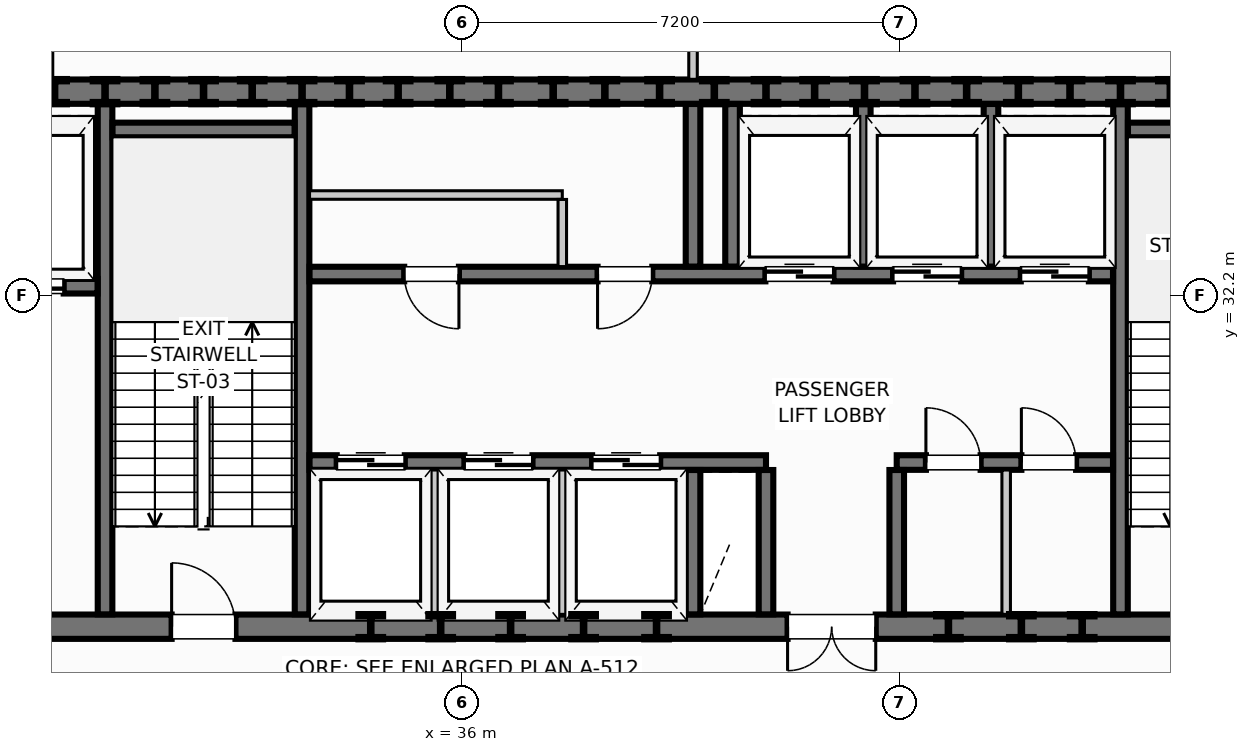
"""IFC4 building model, lengths in metres.
Left out: names, types, materials, properties, quantities, classifications, styles, units other than length and angle.
Written with IfcOpenShell. Run it as: python <this file> out.ifc"""

import sys

from ifc_helpers import new_model, si_unit, direction, frame, frame_2d, origin, origin_2d, place, context, subcontext, project, spatial, rectangle, i_section, extrude, element, fill, save


model = new_model("IFC4")
c1 = context("Model", 3, precision=1e-05, world=origin(), true_north=direction((0.0, 1.0)))
c2 = subcontext(c1, "Body", "Model", "MODEL_VIEW")
j1 = project(units=[si_unit("LENGTHUNIT", "METRE"), si_unit("PLANEANGLEUNIT", "RADIAN")], contexts=[c1])
p1 = place(None, origin())
s1 = spatial("IfcSite", under=j1, at=p1, CompositionType="ELEMENT")
p2 = place(p1, origin())
s2 = spatial("IfcBuilding", under=s1, at=p2, CompositionType="ELEMENT")
p3 = place(p2, frame((0.0, 0.0, 200.35)))
s3 = spatial("IfcBuildingStorey", under=s2, at=p3, CompositionType="ELEMENT", Elevation=200.35)
for number, where, z_axis, x_axis in (
    (1, (30.13, 35.55, 0.0), (0.0, 0.0, 1.0), (1.0, 0.0, 0.0)),
    (2, (31.75, 35.55, 0.0), (0.0, 0.0, 1.0), (1.0, 0.0, 0.0)),
    (3, (33.37, 35.55, 0.0), (0.0, 0.0, 1.0), (1.0, 0.0, 0.0)),
    (4, (34.95, 35.55, 0.0), (0.0, 0.0, 1.0), (1.0, 0.0, 0.0)),
    (5, (36.6, 35.55, 0.0), (0.0, 0.0, 1.0), (1.0, 0.0, 0.0)),
    (6, (38.35, 35.55, 0.0), (0.0, 0.0, 1.0), (1.0, 0.0, 0.0)),
    (7, (40.15, 35.55, 0.0), (0.0, 0.0, 1.0), (1.0, 0.0, 0.0)),
    (8, (41.8, 35.55, 0.0), (0.0, 0.0, 1.0), (1.0, 0.0, 0.0)),
    (9, (43.45, 35.55, 0.0), (0.0, 0.0, 1.0), (1.0, 0.0, 0.0)),
    (10, (45.15, 35.55, 0.0), (0.0, 0.0, 1.0), (1.0, 0.0, 0.0)),
    (11, (46.83, 35.55, 0.0), (0.0, 0.0, 1.0), (1.0, 0.0, 0.0)),
    (12, (34.5, 26.75, 0.0), (0.0, 0.0, 1.0), (1.0, 0.0, 0.0)),
    (13, (36.8, 26.75, 0.0), (0.0, 0.0, 1.0), (1.0, 0.0, 0.0)),
    (14, (39.2, 26.75, 0.0), (0.0, 0.0, 1.0), (1.0, 0.0, 0.0)),
    (15, (45.2, 26.75, 0.0), (0.0, 0.0, 1.0), (1.0, 0.0, 0.0)),
    (16, (32.55, 35.55, 0.0), (0.0, 0.0, 1.0), (1.0, 0.0, 0.0)),
    (17, (37.5, 35.55, 0.0), (0.0, 0.0, 1.0), (1.0, 0.0, 0.0)),
    (18, (42.62, 35.55, 0.0), (0.0, 0.0, 1.0), (1.0, 0.0, 0.0)),
    (19, (47.65, 35.55, 0.0), (0.0, 0.0, 1.0), (1.0, 0.0, 0.0)),
    (20, (29.3, 35.55, 0.0), (0.0, 0.0, 1.0), (1.0, 0.0, 0.0)),
    (21, (30.95, 35.55, 0.0), (0.0, 0.0, 1.0), (1.0, 0.0, 0.0)),
    (22, (34.15, 35.55, 0.0), (0.0, 0.0, 1.0), (1.0, 0.0, 0.0)),
    (23, (35.8, 35.55, 0.0), (0.0, 0.0, 1.0), (1.0, 0.0, 0.0)),
    (24, (39.25, 35.55, 0.0), (0.0, 0.0, 1.0), (1.0, 0.0, 0.0)),
    (25, (41.0, 35.55, 0.0), (0.0, 0.0, 1.0), (1.0, 0.0, 0.0)),
    (26, (44.3, 35.55, 0.0), (0.0, 0.0, 1.0), (1.0, 0.0, 0.0)),
    (27, (46.0, 35.55, 0.0), (0.0, 0.0, 1.0), (1.0, 0.0, 0.0)),
    (28, (35.65, 26.75, 0.0), (0.0, 0.0, 1.0), (1.0, 0.0, 0.0)),
    (29, (38.0, 26.75, 0.0), (0.0, 0.0, 1.0), (1.0, 0.0, 0.0)),
    (30, (44.0, 26.75, 0.0), (0.0, 0.0, 1.0), (1.0, 0.0, 0.0)),
    (31, (46.2, 26.75, 0.0), (0.0, 0.0, 1.0), (1.0, 0.0, 0.0)),
):
    element("IfcColumn", number, at=place(p3, frame(where, z_axis=z_axis, x_axis=x_axis)), inside=s3, PredefinedType="COLUMN", context=c2, shape_type="SweptSolid", body=[
        extrude(i_section(OverallWidth=0.406, OverallDepth=0.416, WebThickness=0.024, FlangeThickness=0.039, at=origin_2d()), origin(), (0.0, 0.0, 1.0), 4.5),
    ])
p4 = place(p3, frame((21.65, 26.75, 0.0), z_axis=(0.0, 0.0, 1.0), x_axis=(1.0, 0.0, 0.0)))
e32 = element("IfcWall", 32, at=p4, inside=s3, PredefinedType="SHEAR", context=c2, shape_type="SweptSolid", body=[
    extrude(rectangle(XDim=28.7, YDim=0.4, at=frame_2d((14.35, 0.0))), origin(), (0.0, 0.0, 1.0), 4.5),
])
p5 = place(p4, frame((1.375, 0.0, 0.0)))
e33 = element("IfcOpeningElement", 33, at=p5, cuts=e32, PredefinedType="OPENING", context=c2, shape_type="SweptSolid", body=[
    extrude(rectangle(XDim=1.05, YDim=2.0, at=frame_2d((0.525, 1.0))), frame((0.0, 0.21, 0.0), z_axis=(0.0, -1.0, 0.0), x_axis=(1.0, 0.0, 0.0)), (0.0, 0.0, 1.0), 0.42),
])
p6 = place(p4, frame((5.375, 0.0, 0.0)))
e34 = element("IfcOpeningElement", 34, at=p6, cuts=e32, PredefinedType="OPENING", context=c2, shape_type="SweptSolid", body=[
    extrude(rectangle(XDim=1.05, YDim=2.0, at=frame_2d((0.525, 1.0))), frame((0.0, 0.21, 0.0), z_axis=(0.0, -1.0, 0.0), x_axis=(1.0, 0.0, 0.0)), (0.0, 0.0, 1.0), 0.42),
])
p7 = place(p4, frame((9.575, 0.0, 0.0)))
e35 = element("IfcOpeningElement", 35, at=p7, cuts=e32, PredefinedType="OPENING", context=c2, shape_type="SweptSolid", body=[
    extrude(rectangle(XDim=1.05, YDim=2.0, at=frame_2d((0.525, 1.0))), frame((0.0, 0.21, 0.0), z_axis=(0.0, -1.0, 0.0), x_axis=(1.0, 0.0, 0.0)), (0.0, 0.0, 1.0), 0.42),
])
p8 = place(p4, frame((19.705, 0.0, 0.0)))
e36 = element("IfcOpeningElement", 36, at=p8, cuts=e32, PredefinedType="OPENING", context=c2, shape_type="SweptSolid", body=[
    extrude(rectangle(XDim=1.45, YDim=2.0, at=frame_2d((0.725, 1.0))), frame((0.0, 0.21, 0.0), z_axis=(0.0, -1.0, 0.0), x_axis=(1.0, 0.0, 0.0)), (0.0, 0.0, 1.0), 0.42),
])
p9 = place(p4, frame((26.275, 0.0, 0.0)))
e37 = element("IfcOpeningElement", 37, at=p9, cuts=e32, PredefinedType="OPENING", context=c2, shape_type="SweptSolid", body=[
    extrude(rectangle(XDim=1.05, YDim=2.0, at=frame_2d((0.525, 1.0))), frame((0.0, 0.21, 0.0), z_axis=(0.0, -1.0, 0.0), x_axis=(1.0, 0.0, 0.0)), (0.0, 0.0, 1.0), 0.42),
])
p10 = place(p3, frame((50.35, 35.55, 0.0), z_axis=(0.0, 0.0, 1.0), x_axis=(-1.0, 0.0, 0.0)))
e38 = element("IfcWall", 38, at=p10, inside=s3, PredefinedType="SHEAR", context=c2, shape_type="SweptSolid", body=[
    extrude(rectangle(XDim=28.7, YDim=0.4, at=frame_2d((14.35, 0.0))), origin(), (0.0, 0.0, 1.0), 4.5),
])
for number, where, z_axis, x_axis in (
    (39, (30.13, 26.953, 0.0), (0.0, 0.0, 1.0), (0.0, 1.0, 0.0)),
    (40, (33.37, 26.953, 0.0), (0.0, 0.0, 1.0), (0.0, 1.0, 0.0)),
):
    element("IfcWall", number, at=place(p3, frame(where, z_axis=z_axis, x_axis=x_axis)), inside=s3, PredefinedType="SHEAR", context=c2, shape_type="SweptSolid", body=[
        extrude(rectangle(XDim=8.394, YDim=0.24, at=frame_2d((4.197, 0.0))), origin(), (0.0, 0.0, 1.0), 4.5),
    ])
p11 = place(p3, frame((30.253, 34.92, 0.0), z_axis=(0.0, 0.0, 1.0), x_axis=(1.0, 0.0, 0.0)))
e41 = element("IfcWall", 41, at=p11, inside=s3, PredefinedType="SHEAR", context=c2, shape_type="SweptSolid", body=[
    extrude(rectangle(XDim=2.994, YDim=0.24, at=frame_2d((1.497, 0.0))), origin(), (0.0, 0.0, 1.0), 4.5),
])
p12 = place(p3, frame((46.83, 26.953, 0.0), z_axis=(0.0, 0.0, 1.0), x_axis=(0.0, 1.0, 0.0)))
e42 = element("IfcWall", 42, at=p12, inside=s3, PredefinedType="SHEAR", context=c2, shape_type="SweptSolid", body=[
    extrude(rectangle(XDim=8.394, YDim=0.24, at=frame_2d((4.197, 0.0))), origin(), (0.0, 0.0, 1.0), 4.5),
])
p13 = place(p3, frame((46.953, 34.92, 0.0), z_axis=(0.0, 0.0, 1.0), x_axis=(1.0, 0.0, 0.0)))
e43 = element("IfcWall", 43, at=p13, inside=s3, PredefinedType="SHEAR", context=c2, shape_type="SweptSolid", body=[
    extrude(rectangle(XDim=2.994, YDim=0.24, at=frame_2d((1.497, 0.0))), origin(), (0.0, 0.0, 1.0), 4.5),
])
p14 = place(p3, frame((25.293, 32.35, 0.0), z_axis=(0.0, 0.0, 1.0), x_axis=(1.0, 0.0, 0.0)))
e44 = element("IfcWall", 44, at=p14, inside=s3, PredefinedType="SHEAR", context=c2, shape_type="SweptSolid", body=[
    extrude(rectangle(XDim=4.714, YDim=0.24, at=frame_2d((2.357, 0.0))), origin(), (0.0, 0.0, 1.0), 4.5),
])
p15 = place(p14, frame((0.707, 0.0, 0.0)))
e45 = element("IfcOpeningElement", 45, at=p15, cuts=e44, PredefinedType="OPENING", context=c2, shape_type="SweptSolid", body=[
    extrude(rectangle(XDim=1.1, YDim=2.0, at=frame_2d((0.55, 1.0))), frame((0.0, 0.13, 0.0), z_axis=(0.0, -1.0, 0.0), x_axis=(1.0, 0.0, 0.0)), (0.0, 0.0, 1.0), 0.26),
])
p16 = place(p14, frame((3.057, 0.0, 0.0)))
e46 = element("IfcOpeningElement", 46, at=p16, cuts=e44, PredefinedType="OPENING", context=c2, shape_type="SweptSolid", body=[
    extrude(rectangle(XDim=1.1, YDim=2.0, at=frame_2d((0.55, 1.0))), frame((0.0, 0.13, 0.0), z_axis=(0.0, -1.0, 0.0), x_axis=(1.0, 0.0, 0.0)), (0.0, 0.0, 1.0), 0.26),
])
p17 = place(p3, frame((33.493, 32.55, 0.0), z_axis=(0.0, 0.0, 1.0), x_axis=(1.0, 0.0, 0.0)))
e47 = element("IfcWall", 47, at=p17, inside=s3, PredefinedType="SHEAR", context=c2, shape_type="SweptSolid", body=[
    extrude(rectangle(XDim=13.214, YDim=0.24, at=frame_2d((6.607, 0.0))), origin(), (0.0, 0.0, 1.0), 4.5),
])
p18 = place(p17, frame((1.557, 0.0, 0.0)))
e48 = element("IfcOpeningElement", 48, at=p18, cuts=e47, PredefinedType="OPENING", context=c2, shape_type="SweptSolid", body=[
    extrude(rectangle(XDim=0.9, YDim=2.0, at=frame_2d((0.45, 1.0))), frame((0.0, 0.13, 0.0), z_axis=(0.0, -1.0, 0.0), x_axis=(1.0, 0.0, 0.0)), (0.0, 0.0, 1.0), 0.26),
])
p19 = place(p17, frame((4.737, 0.0, 0.0)))
e49 = element("IfcOpeningElement", 49, at=p19, cuts=e47, PredefinedType="OPENING", context=c2, shape_type="SweptSolid", body=[
    extrude(rectangle(XDim=0.9, YDim=2.0, at=frame_2d((0.45, 1.0))), frame((0.0, 0.13, 0.0), z_axis=(0.0, -1.0, 0.0), x_axis=(1.0, 0.0, 0.0)), (0.0, 0.0, 1.0), 0.26),
])
p20 = place(p17, frame((7.497, 0.0, 0.0)))
e50 = element("IfcOpeningElement", 50, at=p20, cuts=e47, PredefinedType="OPENING", context=c2, shape_type="SweptSolid", body=[
    extrude(rectangle(XDim=1.12, YDim=2.0, at=frame_2d((0.56, 1.0))), frame((0.0, 0.13, 0.0), z_axis=(0.0, -1.0, 0.0), x_axis=(1.0, 0.0, 0.0)), (0.0, 0.0, 1.0), 0.26),
])
p21 = place(p17, frame((9.597, 0.0, 0.0)))
e51 = element("IfcOpeningElement", 51, at=p21, cuts=e47, PredefinedType="OPENING", context=c2, shape_type="SweptSolid", body=[
    extrude(rectangle(XDim=1.12, YDim=2.0, at=frame_2d((0.56, 1.0))), frame((0.0, 0.13, 0.0), z_axis=(0.0, -1.0, 0.0), x_axis=(1.0, 0.0, 0.0)), (0.0, 0.0, 1.0), 0.26),
])
p22 = place(p17, frame((11.697, 0.0, 0.0)))
e52 = element("IfcOpeningElement", 52, at=p22, cuts=e47, PredefinedType="OPENING", context=c2, shape_type="SweptSolid", body=[
    extrude(rectangle(XDim=1.12, YDim=2.0, at=frame_2d((0.56, 1.0))), frame((0.0, 0.13, 0.0), z_axis=(0.0, -1.0, 0.0), x_axis=(1.0, 0.0, 0.0)), (0.0, 0.0, 1.0), 0.26),
])
p23 = place(p3, frame((33.493, 29.45, 0.0), z_axis=(0.0, 0.0, 1.0), x_axis=(1.0, 0.0, 0.0)))
e53 = element("IfcWall", 53, at=p23, inside=s3, PredefinedType="SHEAR", context=c2, shape_type="SweptSolid", body=[
    extrude(rectangle(XDim=7.507, YDim=0.24, at=frame_2d((3.753, 0.0))), origin(), (0.0, 0.0, 1.0), 4.5),
])
p24 = place(p23, frame((0.447, 0.0, 0.0)))
e54 = element("IfcOpeningElement", 54, at=p24, cuts=e53, PredefinedType="OPENING", context=c2, shape_type="SweptSolid", body=[
    extrude(rectangle(XDim=1.12, YDim=2.0, at=frame_2d((0.56, 1.0))), frame((0.0, 0.13, 0.0), z_axis=(0.0, -1.0, 0.0), x_axis=(1.0, 0.0, 0.0)), (0.0, 0.0, 1.0), 0.26),
])
p25 = place(p23, frame((2.547, 0.0, 0.0)))
e55 = element("IfcOpeningElement", 55, at=p25, cuts=e53, PredefinedType="OPENING", context=c2, shape_type="SweptSolid", body=[
    extrude(rectangle(XDim=1.12, YDim=2.0, at=frame_2d((0.56, 1.0))), frame((0.0, 0.13, 0.0), z_axis=(0.0, -1.0, 0.0), x_axis=(1.0, 0.0, 0.0)), (0.0, 0.0, 1.0), 0.26),
])
p26 = place(p23, frame((4.647, 0.0, 0.0)))
e56 = element("IfcOpeningElement", 56, at=p26, cuts=e53, PredefinedType="OPENING", context=c2, shape_type="SweptSolid", body=[
    extrude(rectangle(XDim=1.12, YDim=2.0, at=frame_2d((0.56, 1.0))), frame((0.0, 0.13, 0.0), z_axis=(0.0, -1.0, 0.0), x_axis=(1.0, 0.0, 0.0)), (0.0, 0.0, 1.0), 0.26),
])
p27 = place(p3, frame((43.15, 29.45, 0.0), z_axis=(0.0, 0.0, 1.0), x_axis=(1.0, 0.0, 0.0)))
e57 = element("IfcWall", 57, at=p27, inside=s3, PredefinedType="SHEAR", context=c2, shape_type="SweptSolid", body=[
    extrude(rectangle(XDim=3.557, YDim=0.24, at=frame_2d((1.779, 0.0))), origin(), (0.0, 0.0, 1.0), 4.5),
])
p28 = place(p27, frame((0.48, 0.0, 0.0)))
e58 = element("IfcOpeningElement", 58, at=p28, cuts=e57, PredefinedType="OPENING", context=c2, shape_type="SweptSolid", body=[
    extrude(rectangle(XDim=0.9, YDim=2.0, at=frame_2d((0.45, 1.0))), frame((0.0, 0.13, 0.0), z_axis=(0.0, -1.0, 0.0), x_axis=(1.0, 0.0, 0.0)), (0.0, 0.0, 1.0), 0.26),
])
p29 = place(p27, frame((2.05, 0.0, 0.0)))
e59 = element("IfcOpeningElement", 59, at=p29, cuts=e57, PredefinedType="OPENING", context=c2, shape_type="SweptSolid", body=[
    extrude(rectangle(XDim=0.9, YDim=2.0, at=frame_2d((0.45, 1.0))), frame((0.0, 0.13, 0.0), z_axis=(0.0, -1.0, 0.0), x_axis=(1.0, 0.0, 0.0)), (0.0, 0.0, 1.0), 0.26),
])
for number, where, z_axis, x_axis in (
    (60, (41.0, 26.953, 0.0), (0.0, 0.0, 1.0), (0.0, 1.0, 0.0)),
    (61, (43.15, 26.953, 0.0), (0.0, 0.0, 1.0), (0.0, 1.0, 0.0)),
):
    element("IfcWall", number, at=place(p3, frame(where, z_axis=z_axis, x_axis=x_axis)), inside=s3, PredefinedType="SHEAR", context=c2, shape_type="SweptSolid", body=[
        extrude(rectangle(XDim=2.374, YDim=0.24, at=frame_2d((1.187, 0.0))), origin(), (0.0, 0.0, 1.0), 4.5),
    ])
for number, where, z_axis, x_axis in (
    (62, (39.8, 32.673, 0.0), (0.0, 0.0, 1.0), (0.0, 1.0, 0.0)),
    (63, (40.45, 32.673, 0.0), (0.0, 0.0, 1.0), (0.0, 1.0, 0.0)),
    (64, (42.6, 32.673, 0.0), (0.0, 0.0, 1.0), (0.0, 1.0, 0.0)),
    (65, (44.7, 32.673, 0.0), (0.0, 0.0, 1.0), (0.0, 1.0, 0.0)),
):
    element("IfcWall", number, at=place(p3, frame(where, z_axis=z_axis, x_axis=x_axis)), inside=s3, PredefinedType="SHEAR", context=c2, shape_type="SweptSolid", body=[
        extrude(rectangle(XDim=2.674, YDim=0.24, at=frame_2d((1.337, 0.0))), origin(), (0.0, 0.0, 1.0), 4.5),
    ])
p30 = place(p3, frame((39.8, 26.953, 0.0), z_axis=(0.0, 0.0, 1.0), x_axis=(0.0, 1.0, 0.0)))
e66 = element("IfcWall", 66, at=p30, inside=s3, PredefinedType="SHEAR", context=c2, shape_type="SweptSolid", body=[
    extrude(rectangle(XDim=2.374, YDim=0.24, at=frame_2d((1.187, 0.0))), origin(), (0.0, 0.0, 1.0), 4.5),
])
p31 = place(p3, frame((33.493, 33.85, 0.0), z_axis=(0.0, 0.0, 1.0), x_axis=(1.0, 0.0, 0.0)))
e67 = element("IfcWall", 67, at=p31, inside=s3, PredefinedType="PARTITIONING", context=c2, shape_type="SweptSolid", body=[
    extrude(rectangle(XDim=4.157, YDim=0.14, at=frame_2d((2.079, 0.0))), origin(), (0.0, 0.0, 1.0), 4.245),
])
p32 = place(p3, frame((37.65, 32.673, 0.0), z_axis=(0.0, 0.0, 1.0), x_axis=(0.0, 1.0, 0.0)))
e68 = element("IfcWall", 68, at=p32, inside=s3, PredefinedType="PARTITIONING", context=c2, shape_type="SweptSolid", body=[
    extrude(rectangle(XDim=1.104, YDim=0.14, at=frame_2d((0.552, 0.0))), origin(), (0.0, 0.0, 1.0), 4.245),
])
for number, where, z_axis, x_axis in (
    (69, (35.55, 26.953, 0.0), (0.0, 0.0, 1.0), (0.0, 1.0, 0.0)),
    (70, (37.65, 26.953, 0.0), (0.0, 0.0, 1.0), (0.0, 1.0, 0.0)),
):
    element("IfcWall", number, at=place(p3, frame(where, z_axis=z_axis, x_axis=x_axis)), inside=s3, PredefinedType="MOVABLE", context=c2, shape_type="SweptSolid", body=[
        extrude(rectangle(XDim=2.374, YDim=0.16, at=frame_2d((1.187, 0.0))), origin(), (0.0, 0.0, 1.0), 4.245),
    ])
p33 = place(p3, frame((44.95, 26.953, 0.0), z_axis=(0.0, 0.0, 1.0), x_axis=(0.0, 1.0, 0.0)))
e71 = element("IfcWall", 71, at=p33, inside=s3, PredefinedType="PARTITIONING", context=c2, shape_type="SweptSolid", body=[
    extrude(rectangle(XDim=2.374, YDim=0.14, at=frame_2d((1.187, 0.0))), origin(), (0.0, 0.0, 1.0), 4.245),
])
p34 = place(p3, frame((29.2, 35.753, 0.0), z_axis=(0.0, 0.0, 1.0), x_axis=(0.0, 1.0, 0.0)))
e72 = element("IfcWall", 72, at=p34, inside=s3, PredefinedType="PARTITIONING", context=c2, shape_type="SweptSolid", body=[
    extrude(rectangle(XDim=11.557, YDim=0.14, at=frame_2d((5.779, 0.0))), origin(), (0.0, 0.0, 1.0), 4.245),
])
p35 = place(p3, frame((39.8, 35.753, 0.0), z_axis=(0.0, 0.0, 1.0), x_axis=(0.0, 1.0, 0.0)))
e73 = element("IfcWall", 73, at=p35, inside=s3, PredefinedType="PARTITIONING", context=c2, shape_type="SweptSolid", body=[
    extrude(rectangle(XDim=11.786, YDim=0.14, at=frame_2d((5.893, 0.0))), origin(), (0.0, 0.0, 1.0), 4.245),
])
p36 = place(p35, frame((5.453, 0.0, 0.0)))
e74 = element("IfcOpeningElement", 74, at=p36, cuts=e73, PredefinedType="OPENING", context=c2, shape_type="SweptSolid", body=[
    extrude(rectangle(XDim=0.9, YDim=2.0, at=frame_2d((0.45, 1.0))), frame((0.0, 0.08, 0.0), z_axis=(0.0, -1.0, 0.0), x_axis=(1.0, 0.0, 0.0)), (0.0, 0.0, 1.0), 0.16),
])
p37 = place(p18, frame((0.9, 0.0, 0.0), z_axis=(0.0, 0.0, 1.0), x_axis=(-1.0, 0.0, 0.0)))
e75 = element("IfcDoor", 75, at=p37, inside=s3, OperationType="SINGLE_SWING_LEFT", PredefinedType="DOOR", context=c2, shape_type="SweptSolid", body=[
    extrude(rectangle(XDim=0.9, YDim=2.0, at=frame_2d((0.45, 1.0))), frame((0.0, 0.025, 0.0), z_axis=(0.0, -1.0, 0.0), x_axis=(1.0, 0.0, 0.0)), (0.0, 0.0, 1.0), 0.05),
])
fill(e48, e75)
p38 = place(p19, frame((0.9, 0.0, 0.0), z_axis=(0.0, 0.0, 1.0), x_axis=(-1.0, 0.0, 0.0)))
e76 = element("IfcDoor", 76, at=p38, inside=s3, OperationType="SINGLE_SWING_RIGHT", PredefinedType="DOOR", context=c2, shape_type="SweptSolid", body=[
    extrude(rectangle(XDim=0.9, YDim=2.0, at=frame_2d((0.45, 1.0))), frame((0.0, 0.025, 0.0), z_axis=(0.0, -1.0, 0.0), x_axis=(1.0, 0.0, 0.0)), (0.0, 0.0, 1.0), 0.05),
])
fill(e49, e76)
p39 = place(p28, origin())
e77 = element("IfcDoor", 77, at=p39, inside=s3, OperationType="SINGLE_SWING_LEFT", PredefinedType="DOOR", context=c2, shape_type="SweptSolid", body=[
    extrude(rectangle(XDim=0.9, YDim=2.0, at=frame_2d((0.45, 1.0))), frame((0.0, 0.025, 0.0), z_axis=(0.0, -1.0, 0.0), x_axis=(1.0, 0.0, 0.0)), (0.0, 0.0, 1.0), 0.05),
])
fill(e58, e77)
p40 = place(p29, origin())
e78 = element("IfcDoor", 78, at=p40, inside=s3, OperationType="SINGLE_SWING_LEFT", PredefinedType="DOOR", context=c2, shape_type="SweptSolid", body=[
    extrude(rectangle(XDim=0.9, YDim=2.0, at=frame_2d((0.45, 1.0))), frame((0.0, 0.025, 0.0), z_axis=(0.0, -1.0, 0.0), x_axis=(1.0, 0.0, 0.0)), (0.0, 0.0, 1.0), 0.05),
])
fill(e59, e78)
p41 = place(p7, origin())
e79 = element("IfcDoor", 79, at=p41, inside=s3, OperationType="SINGLE_SWING_LEFT", PredefinedType="DOOR", context=c2, shape_type="SweptSolid", body=[
    extrude(rectangle(XDim=1.05, YDim=2.0, at=frame_2d((0.525, 1.0))), frame((0.0, 0.025, 0.0), z_axis=(0.0, -1.0, 0.0), x_axis=(1.0, 0.0, 0.0)), (0.0, 0.0, 1.0), 0.05),
])
fill(e35, e79)
p42 = place(p8, frame((1.45, 0.0, 0.0), z_axis=(0.0, 0.0, 1.0), x_axis=(-1.0, 0.0, 0.0)))
e80 = element("IfcDoor", 80, at=p42, inside=s3, OperationType="DOUBLE_DOOR_SINGLE_SWING", PredefinedType="DOOR", context=c2, shape_type="SweptSolid", body=[
    extrude(rectangle(XDim=1.45, YDim=2.0, at=frame_2d((0.725, 1.0))), frame((0.0, 0.025, 0.0), z_axis=(0.0, -1.0, 0.0), x_axis=(1.0, 0.0, 0.0)), (0.0, 0.0, 1.0), 0.05),
])
fill(e36, e80)
p43 = place(p16, origin())
e81 = element("IfcDoor", 81, at=p43, inside=s3, OperationType="DOUBLE_DOOR_SLIDING", PredefinedType="USERDEFINED", context=c2, shape_type="SweptSolid", body=[
    extrude(rectangle(XDim=1.1, YDim=2.0, at=frame_2d((0.55, 1.0))), frame((0.0, 0.025, 0.0), z_axis=(0.0, -1.0, 0.0), x_axis=(1.0, 0.0, 0.0)), (0.0, 0.0, 1.0), 0.05),
])
fill(e46, e81)
p44 = place(p24, origin())
e82 = element("IfcDoor", 82, at=p44, inside=s3, OperationType="DOUBLE_DOOR_SLIDING", PredefinedType="USERDEFINED", context=c2, shape_type="SweptSolid", body=[
    extrude(rectangle(XDim=1.12, YDim=2.0, at=frame_2d((0.56, 1.0))), frame((0.0, 0.025, 0.0), z_axis=(0.0, -1.0, 0.0), x_axis=(1.0, 0.0, 0.0)), (0.0, 0.0, 1.0), 0.05),
])
fill(e54, e82)
p45 = place(p25, origin())
e83 = element("IfcDoor", 83, at=p45, inside=s3, OperationType="DOUBLE_DOOR_SLIDING", PredefinedType="USERDEFINED", context=c2, shape_type="SweptSolid", body=[
    extrude(rectangle(XDim=1.12, YDim=2.0, at=frame_2d((0.56, 1.0))), frame((0.0, 0.025, 0.0), z_axis=(0.0, -1.0, 0.0), x_axis=(1.0, 0.0, 0.0)), (0.0, 0.0, 1.0), 0.05),
])
fill(e55, e83)
p46 = place(p26, origin())
e84 = element("IfcDoor", 84, at=p46, inside=s3, OperationType="DOUBLE_DOOR_SLIDING", PredefinedType="USERDEFINED", context=c2, shape_type="SweptSolid", body=[
    extrude(rectangle(XDim=1.12, YDim=2.0, at=frame_2d((0.56, 1.0))), frame((0.0, 0.025, 0.0), z_axis=(0.0, -1.0, 0.0), x_axis=(1.0, 0.0, 0.0)), (0.0, 0.0, 1.0), 0.05),
])
fill(e56, e84)
p47 = place(p20, origin())
e85 = element("IfcDoor", 85, at=p47, inside=s3, OperationType="DOUBLE_DOOR_SLIDING", PredefinedType="USERDEFINED", context=c2, shape_type="SweptSolid", body=[
    extrude(rectangle(XDim=1.12, YDim=2.0, at=frame_2d((0.56, 1.0))), frame((0.0, 0.025, 0.0), z_axis=(0.0, -1.0, 0.0), x_axis=(1.0, 0.0, 0.0)), (0.0, 0.0, 1.0), 0.05),
])
fill(e50, e85)
p48 = place(p21, origin())
e86 = element("IfcDoor", 86, at=p48, inside=s3, OperationType="DOUBLE_DOOR_SLIDING", PredefinedType="USERDEFINED", context=c2, shape_type="SweptSolid", body=[
    extrude(rectangle(XDim=1.12, YDim=2.0, at=frame_2d((0.56, 1.0))), frame((0.0, 0.025, 0.0), z_axis=(0.0, -1.0, 0.0), x_axis=(1.0, 0.0, 0.0)), (0.0, 0.0, 1.0), 0.05),
])
fill(e51, e86)
p49 = place(p22, origin())
e87 = element("IfcDoor", 87, at=p49, inside=s3, OperationType="DOUBLE_DOOR_SLIDING", PredefinedType="USERDEFINED", context=c2, shape_type="SweptSolid", body=[
    extrude(rectangle(XDim=1.12, YDim=2.0, at=frame_2d((0.56, 1.0))), frame((0.0, 0.025, 0.0), z_axis=(0.0, -1.0, 0.0), x_axis=(1.0, 0.0, 0.0)), (0.0, 0.0, 1.0), 0.05),
])
fill(e52, e87)
save(model, sys.argv[1])
